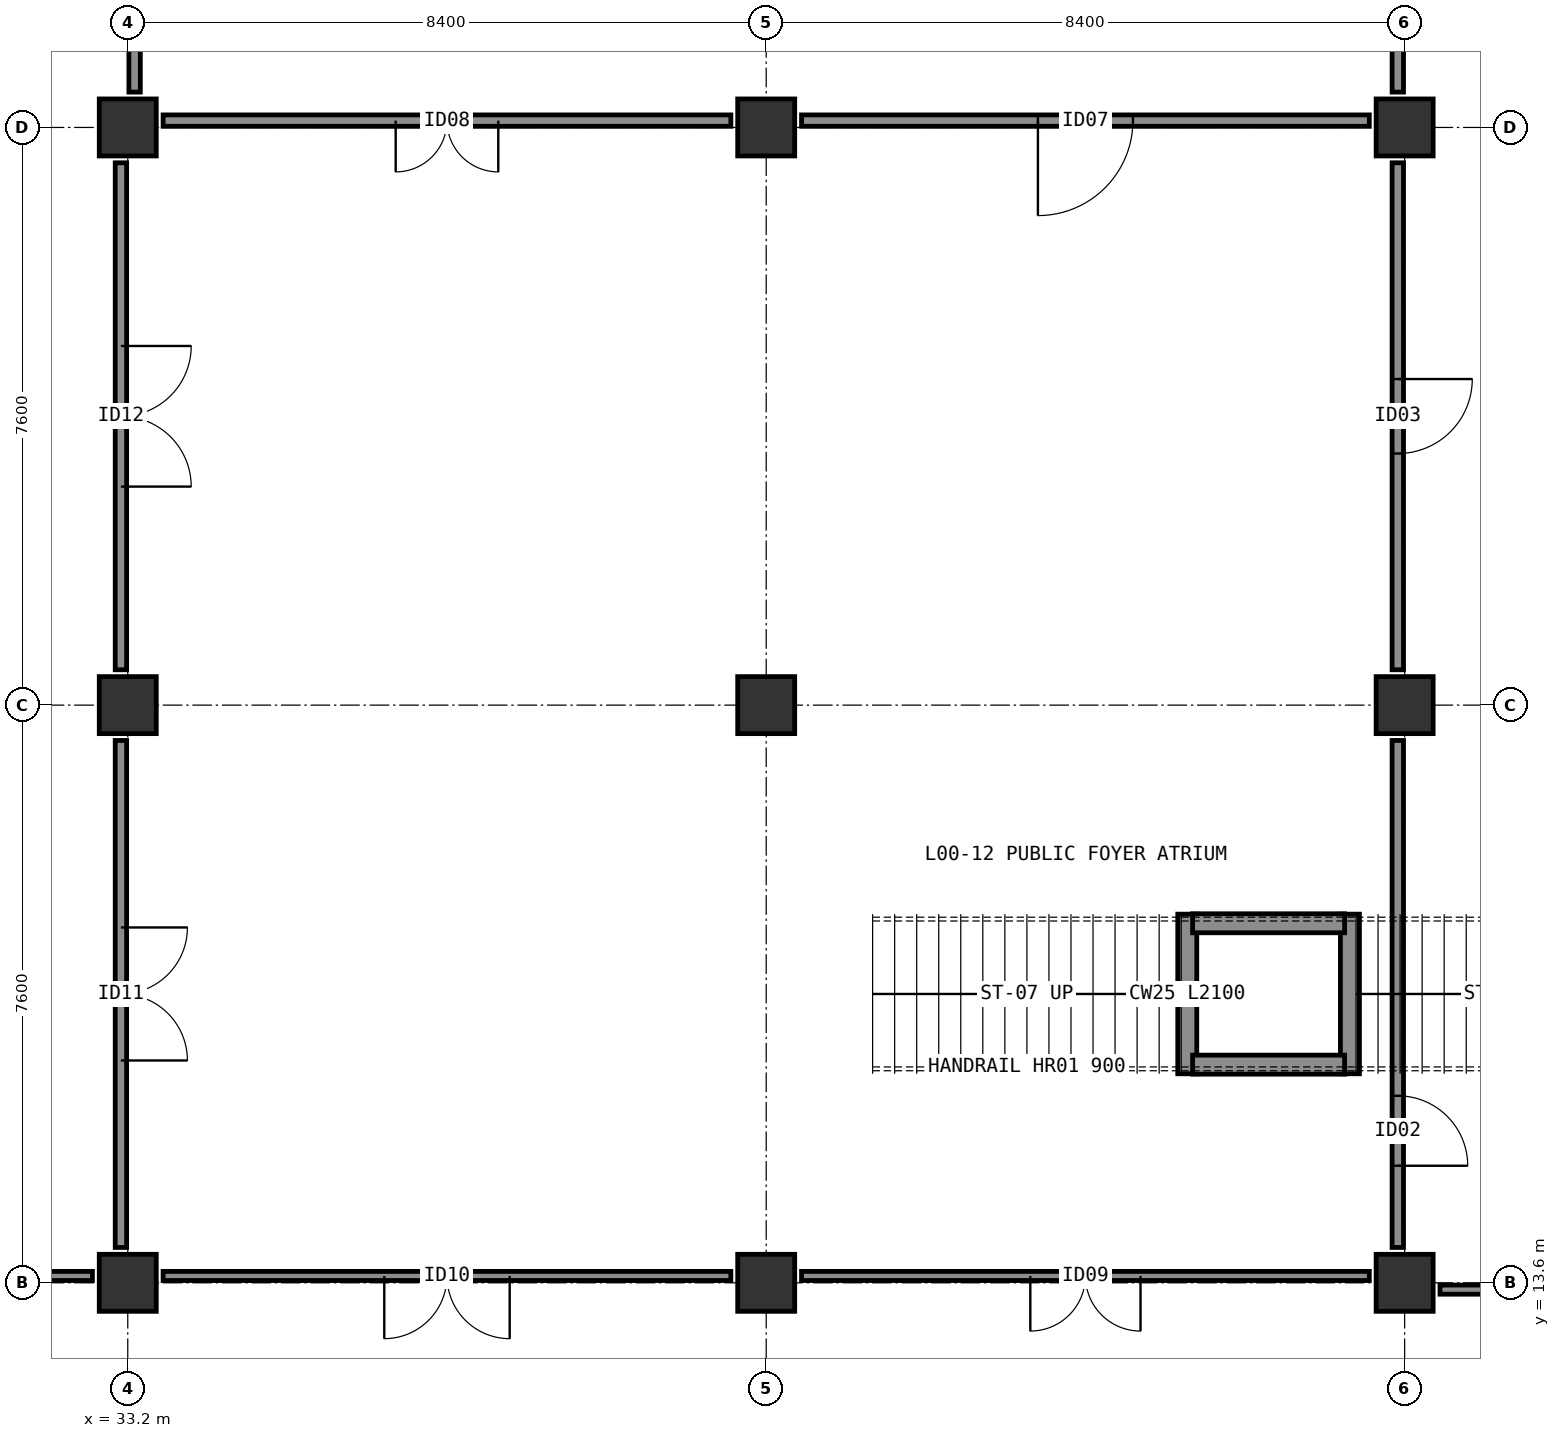
"""IFC4 building model, lengths in metres.
Left out: names, types, materials, properties, quantities, classifications, styles, units other than length and angle.
Written with IfcOpenShell. Run it as: python <this file> out.ifc"""

import sys

from ifc_helpers import new_model, si_unit, direction, frame, frame_2d, origin, origin_2d, place, context, subcontext, project, spatial, rectangle, extrude, element, fill, save


model = new_model("IFC4")
c1 = context("Model", 3, precision=1e-05, world=origin(), true_north=direction((0.0, 1.0)))
c2 = subcontext(c1, "Body", "Model", "MODEL_VIEW")
j1 = project(units=[si_unit("LENGTHUNIT", "METRE"), si_unit("PLANEANGLEUNIT", "RADIAN")], contexts=[c1])
p1 = place(None, origin())
s1 = spatial("IfcSite", under=j1, at=p1, CompositionType="ELEMENT")
p2 = place(p1, origin())
s2 = spatial("IfcBuilding", under=s1, at=p2, CompositionType="ELEMENT")
p3 = place(p2, origin())
s3 = spatial("IfcBuildingStorey", under=s2, at=p3, CompositionType="ELEMENT", Elevation=0.0)
for number, where, z_axis, x_axis in (
    (1, (33.2, 13.6, 0.0), (0.0, 0.0, 1.0), (1.0, 0.0, 0.0)),
    (2, (41.6, 13.6, 0.0), (0.0, 0.0, 1.0), (1.0, 0.0, 0.0)),
    (3, (50.0, 13.6, 0.0), (0.0, 0.0, 1.0), (1.0, 0.0, 0.0)),
    (4, (33.2, 21.2, 0.0), (0.0, 0.0, 1.0), (1.0, 0.0, 0.0)),
    (5, (41.6, 21.2, 0.0), (0.0, 0.0, 1.0), (1.0, 0.0, 0.0)),
    (6, (50.0, 21.2, 0.0), (0.0, 0.0, 1.0), (1.0, 0.0, 0.0)),
    (7, (33.2, 28.8, 0.0), (0.0, 0.0, 1.0), (1.0, 0.0, 0.0)),
    (8, (41.6, 28.8, 0.0), (0.0, 0.0, 1.0), (1.0, 0.0, 0.0)),
    (9, (50.0, 28.8, 0.0), (0.0, 0.0, 1.0), (1.0, 0.0, 0.0)),
):
    element("IfcColumn", number, at=place(p3, frame(where, z_axis=z_axis, x_axis=x_axis)), inside=s3, PredefinedType="COLUMN", context=c2, shape_type="SweptSolid", body=[
        extrude(rectangle(XDim=0.75, YDim=0.75, at=origin_2d()), origin(), (0.0, 0.0, 1.0), 4.8),
    ])
for number, where, z_axis, x_axis in (
    (10, (47.14, 16.35, 0.0), (0.0, 0.0, 1.0), (0.0, 1.0, 0.0)),
    (11, (49.28, 16.35, 0.0), (0.0, 0.0, 1.0), (0.0, 1.0, 0.0)),
):
    element("IfcWall", number, at=place(p3, frame(where, z_axis=z_axis, x_axis=x_axis)), inside=s3, PredefinedType="SHEAR", context=c2, shape_type="SweptSolid", body=[
        extrude(rectangle(XDim=2.1, YDim=0.25, at=frame_2d((1.05, 0.0))), origin(), (0.0, 0.0, 1.0), 2.21),
    ])
for number, where, z_axis, x_axis in (
    (12, (47.21, 16.47, 0.0), (0.0, 0.0, 1.0), (1.0, 0.0, 0.0)),
    (13, (47.21, 18.33, 0.0), (0.0, 0.0, 1.0), (1.0, 0.0, 0.0)),
):
    element("IfcWall", number, at=place(p3, frame(where, z_axis=z_axis, x_axis=x_axis)), inside=s3, PredefinedType="SHEAR", context=c2, shape_type="SweptSolid", body=[
        extrude(rectangle(XDim=2.0, YDim=0.25, at=frame_2d((1.0, 0.0))), origin(), (0.0, 0.0, 1.0), 2.21),
    ])
p4 = place(p3, frame((33.29, 29.265, 0.0), z_axis=(0.0, 0.0, 1.0), x_axis=(0.0, 1.0, 0.0)))
e14 = element("IfcWall", 14, at=p4, inside=s3, PredefinedType="PARTITIONING", context=c2, shape_type="SweptSolid", body=[
    extrude(rectangle(XDim=6.655, YDim=0.15, at=frame_2d((3.328, 0.0))), origin(), (0.0, 0.0, 1.0), 4.5),
])
p5 = place(p4, frame((2.603, 0.0, 0.0)))
e15 = element("IfcOpeningElement", 15, at=p5, cuts=e14, PredefinedType="OPENING", context=c2, shape_type="SweptSolid", body=[
    extrude(rectangle(XDim=1.45, YDim=2.18, at=frame_2d((0.725, 1.09))), frame((0.0, 0.085, 0.0), z_axis=(0.0, -1.0, 0.0), x_axis=(1.0, 0.0, 0.0)), (0.0, 0.0, 1.0), 0.17),
])
p6 = place(p3, frame((49.91, 35.92, 0.0), z_axis=(0.0, 0.0, 1.0), x_axis=(-7.3370263e-05, -0.999999997308, 0.0)))
e16 = element("IfcWall", 16, at=p6, inside=s3, PredefinedType="PARTITIONING", context=c2, shape_type="SweptSolid", body=[
    extrude(rectangle(XDim=6.655, YDim=0.15, at=frame_2d((3.328, 0.0))), origin(), (0.0, 0.0, 1.0), 3.81),
])
p7 = place(p6, frame((2.502, 0.0, 0.0)))
e17 = element("IfcOpeningElement", 17, at=p7, cuts=e16, PredefinedType="OPENING", context=c2, shape_type="SweptSolid", body=[
    extrude(rectangle(XDim=1.65, YDim=2.18, at=frame_2d((0.825, 1.09))), frame((0.0, 0.085, 0.0), z_axis=(0.0, -1.0, 0.0), x_axis=(1.0, 0.0, 0.0)), (0.0, 0.0, 1.0), 0.17),
])
p8 = place(p3, frame((33.11, 20.735, 0.0), z_axis=(0.0, 0.0, 1.0), x_axis=(0.0, -1.0, 0.0)))
e18 = element("IfcWall", 18, at=p8, inside=s3, PredefinedType="PARTITIONING", context=c2, shape_type="SweptSolid", body=[
    extrude(rectangle(XDim=6.67, YDim=0.15, at=frame_2d((3.335, 0.0))), origin(), (0.0, 0.0, 1.0), 3.81),
])
p9 = place(p8, frame((2.46, 0.0, 0.0)))
e19 = element("IfcOpeningElement", 19, at=p9, cuts=e18, PredefinedType="OPENING", context=c2, shape_type="SweptSolid", body=[
    extrude(rectangle(XDim=1.75, YDim=2.22, at=frame_2d((0.875, 1.11))), frame((0.0, 0.085, 0.0), z_axis=(0.0, -1.0, 0.0), x_axis=(1.0, 0.0, 0.0)), (0.0, 0.0, 1.0), 0.17),
])
p10 = place(p3, frame((33.11, 28.335, 0.0), z_axis=(0.0, 0.0, 1.0), x_axis=(0.0, -1.0, 0.0)))
e20 = element("IfcWall", 20, at=p10, inside=s3, PredefinedType="PARTITIONING", context=c2, shape_type="SweptSolid", body=[
    extrude(rectangle(XDim=6.67, YDim=0.15, at=frame_2d((3.335, 0.0))), origin(), (0.0, 0.0, 1.0), 3.81),
])
p11 = place(p10, frame((2.41, 0.0, 0.0)))
e21 = element("IfcOpeningElement", 21, at=p11, cuts=e20, PredefinedType="OPENING", context=c2, shape_type="SweptSolid", body=[
    extrude(rectangle(XDim=1.85, YDim=2.22, at=frame_2d((0.925, 1.11))), frame((0.0, 0.085, 0.0), z_axis=(0.0, -1.0, 0.0), x_axis=(1.0, 0.0, 0.0)), (0.0, 0.0, 1.0), 0.17),
])
p12 = place(p3, frame((32.735, 13.69, 0.0), z_axis=(0.0, 0.0, 1.0), x_axis=(-1.0, 0.0, 0.0)))
e22 = element("IfcWall", 22, at=p12, inside=s3, PredefinedType="PARTITIONING", context=c2, shape_type="SweptSolid", body=[
    extrude(rectangle(XDim=7.455, YDim=0.12, at=frame_2d((3.728, 0.0))), origin(), (0.0, 0.0, 1.0), 4.5),
])
p13 = place(p12, frame((3.288, 0.0, 0.0)))
e23 = element("IfcOpeningElement", 23, at=p13, cuts=e22, PredefinedType="OPENING", context=c2, shape_type="SweptSolid", body=[
    extrude(rectangle(XDim=0.88, YDim=2.08, at=frame_2d((0.44, 1.04))), frame((0.0, 0.07, 0.0), z_axis=(0.0, -1.0, 0.0), x_axis=(1.0, 0.0, 0.0)), (0.0, 0.0, 1.0), 0.14),
])
p14 = place(p3, frame((49.91, 20.735, 0.0), z_axis=(0.0, 0.0, 1.0), x_axis=(0.0, -1.0, 0.0)))
e24 = element("IfcWall", 24, at=p14, inside=s3, PredefinedType="PARTITIONING", context=c2, shape_type="SweptSolid", body=[
    extrude(rectangle(XDim=6.67, YDim=0.15, at=frame_2d((3.335, 0.0))), origin(), (0.0, 0.0, 1.0), 4.5),
])
p15 = place(p14, frame((4.675, 0.0, 0.0)))
e25 = element("IfcOpeningElement", 25, at=p15, cuts=e24, PredefinedType="OPENING", context=c2, shape_type="SweptSolid", body=[
    extrude(rectangle(XDim=0.92, YDim=2.08, at=frame_2d((0.46, 1.04))), frame((0.0, 0.085, 0.0), z_axis=(0.0, -1.0, 0.0), x_axis=(1.0, 0.0, 0.0)), (0.0, 0.0, 1.0), 0.17),
])
p16 = place(p3, frame((49.91, 28.335, 0.0), z_axis=(0.0, 0.0, 1.0), x_axis=(0.0, -1.0, 0.0)))
e26 = element("IfcWall", 26, at=p16, inside=s3, PredefinedType="PARTITIONING", context=c2, shape_type="SweptSolid", body=[
    extrude(rectangle(XDim=6.67, YDim=0.15, at=frame_2d((3.335, 0.0))), origin(), (0.0, 0.0, 1.0), 4.5),
])
p17 = place(p16, frame((2.845, 0.0, 0.0)))
e27 = element("IfcOpeningElement", 27, at=p17, cuts=e26, PredefinedType="OPENING", context=c2, shape_type="SweptSolid", body=[
    extrude(rectangle(XDim=0.98, YDim=2.08, at=frame_2d((0.49, 1.04))), frame((0.0, 0.085, 0.0), z_axis=(0.0, -1.0, 0.0), x_axis=(1.0, 0.0, 0.0)), (0.0, 0.0, 1.0), 0.17),
])
p18 = place(p3, frame((50.465, 13.51, 0.0), z_axis=(0.0, 0.0, 1.0), x_axis=(1.0, 0.0, 0.0)))
e28 = element("IfcWall", 28, at=p18, inside=s3, PredefinedType="PARTITIONING", context=c2, shape_type="SweptSolid", body=[
    extrude(rectangle(XDim=7.47, YDim=0.12, at=frame_2d((3.735, 0.0))), origin(), (0.0, 0.0, 1.0), 3.81),
])
p19 = place(p18, frame((3.225, 0.0, 0.0)))
e29 = element("IfcOpeningElement", 29, at=p19, cuts=e28, PredefinedType="OPENING", context=c2, shape_type="SweptSolid", body=[
    extrude(rectangle(XDim=1.02, YDim=2.12, at=frame_2d((0.51, 1.06))), frame((0.0, 0.07, 0.0), z_axis=(0.0, -1.0, 0.0), x_axis=(1.0, 0.0, 0.0)), (0.0, 0.0, 1.0), 0.14),
])
p20 = place(p3, frame((49.535, 28.89, 0.0), z_axis=(0.0, 0.0, 1.0), x_axis=(-1.0, 0.0, 0.0)))
e30 = element("IfcWall", 30, at=p20, inside=s3, PredefinedType="PARTITIONING", context=c2, shape_type="SweptSolid", body=[
    extrude(rectangle(XDim=7.47, YDim=0.15, at=frame_2d((3.735, 0.0))), origin(), (0.0, 0.0, 1.0), 3.81),
])
p21 = place(p20, frame((3.11, 0.0, 0.0)))
e31 = element("IfcOpeningElement", 31, at=p21, cuts=e30, PredefinedType="OPENING", context=c2, shape_type="SweptSolid", body=[
    extrude(rectangle(XDim=1.25, YDim=2.12, at=frame_2d((0.625, 1.06))), frame((0.0, 0.085, 0.0), z_axis=(0.0, -1.0, 0.0), x_axis=(1.0, 0.0, 0.0)), (0.0, 0.0, 1.0), 0.17),
])
p22 = place(p3, frame((41.135, 28.89, 0.0), z_axis=(0.0, 0.0, 1.0), x_axis=(-1.0, 0.0, 0.0)))
e32 = element("IfcWall", 32, at=p22, inside=s3, PredefinedType="PARTITIONING", context=c2, shape_type="SweptSolid", body=[
    extrude(rectangle(XDim=7.47, YDim=0.15, at=frame_2d((3.735, 0.0))), origin(), (0.0, 0.0, 1.0), 4.047),
])
p23 = place(p22, frame((3.06, 0.0, 0.0)))
e33 = element("IfcOpeningElement", 33, at=p23, cuts=e32, PredefinedType="OPENING", context=c2, shape_type="SweptSolid", body=[
    extrude(rectangle(XDim=1.35, YDim=2.18, at=frame_2d((0.675, 1.09))), frame((0.0, 0.085, 0.0), z_axis=(0.0, -1.0, 0.0), x_axis=(1.0, 0.0, 0.0)), (0.0, 0.0, 1.0), 0.17),
])
p24 = place(p3, frame((49.535, 13.69, 0.0), z_axis=(0.0, 0.0, 1.0), x_axis=(-1.0, 0.0, 0.0)))
e34 = element("IfcWall", 34, at=p24, inside=s3, PredefinedType="PARTITIONING", context=c2, shape_type="SweptSolid", body=[
    extrude(rectangle(XDim=7.47, YDim=0.12, at=frame_2d((3.735, 0.0))), origin(), (0.0, 0.0, 1.0), 3.81),
])
p25 = place(p24, frame((3.01, 0.0, 0.0)))
e35 = element("IfcOpeningElement", 35, at=p25, cuts=e34, PredefinedType="OPENING", context=c2, shape_type="SweptSolid", body=[
    extrude(rectangle(XDim=1.45, YDim=2.18, at=frame_2d((0.725, 1.09))), frame((0.0, 0.07, 0.0), z_axis=(0.0, -1.0, 0.0), x_axis=(1.0, 0.0, 0.0)), (0.0, 0.0, 1.0), 0.14),
])
p26 = place(p3, frame((41.135, 13.69, 0.0), z_axis=(0.0, 0.0, 1.0), x_axis=(-1.0, 0.0, 0.0)))
e36 = element("IfcWall", 36, at=p26, inside=s3, PredefinedType="PARTITIONING", context=c2, shape_type="SweptSolid", body=[
    extrude(rectangle(XDim=7.47, YDim=0.12, at=frame_2d((3.735, 0.0))), origin(), (0.0, 0.0, 1.0), 3.81),
])
p27 = place(p26, frame((2.91, 0.0, 0.0)))
e37 = element("IfcOpeningElement", 37, at=p27, cuts=e36, PredefinedType="OPENING", context=c2, shape_type="SweptSolid", body=[
    extrude(rectangle(XDim=1.65, YDim=2.18, at=frame_2d((0.825, 1.09))), frame((0.0, 0.07, 0.0), z_axis=(0.0, -1.0, 0.0), x_axis=(1.0, 0.0, 0.0)), (0.0, 0.0, 1.0), 0.14),
])
p28 = place(p9, origin())
e38 = element("IfcDoor", 38, at=p28, inside=s3, OperationType="DOUBLE_DOOR_SINGLE_SWING", PredefinedType="DOOR", context=c2, shape_type="SweptSolid", body=[
    extrude(rectangle(XDim=1.75, YDim=2.22, at=frame_2d((0.875, 1.11))), frame((0.0, 0.025, 0.0), z_axis=(0.0, -1.0, 0.0), x_axis=(1.0, 0.0, 0.0)), (0.0, 0.0, 1.0), 0.05),
])
fill(e19, e38)
p29 = place(p11, origin())
e39 = element("IfcDoor", 39, at=p29, inside=s3, OperationType="DOUBLE_DOOR_SINGLE_SWING", PredefinedType="DOOR", context=c2, shape_type="SweptSolid", body=[
    extrude(rectangle(XDim=1.85, YDim=2.22, at=frame_2d((0.925, 1.11))), frame((0.0, 0.025, 0.0), z_axis=(0.0, -1.0, 0.0), x_axis=(1.0, 0.0, 0.0)), (0.0, 0.0, 1.0), 0.05),
])
fill(e21, e39)
p30 = place(p15, origin())
e40 = element("IfcDoor", 40, at=p30, inside=s3, OperationType="SINGLE_SWING_RIGHT", PredefinedType="DOOR", context=c2, shape_type="SweptSolid", body=[
    extrude(rectangle(XDim=0.92, YDim=2.08, at=frame_2d((0.46, 1.04))), frame((0.0, 0.025, 0.0), z_axis=(0.0, -1.0, 0.0), x_axis=(1.0, 0.0, 0.0)), (0.0, 0.0, 1.0), 0.05),
])
fill(e25, e40)
p31 = place(p17, origin())
e41 = element("IfcDoor", 41, at=p31, inside=s3, OperationType="SINGLE_SWING_LEFT", PredefinedType="DOOR", context=c2, shape_type="SweptSolid", body=[
    extrude(rectangle(XDim=0.98, YDim=2.08, at=frame_2d((0.49, 1.04))), frame((0.0, 0.025, 0.0), z_axis=(0.0, -1.0, 0.0), x_axis=(1.0, 0.0, 0.0)), (0.0, 0.0, 1.0), 0.05),
])
fill(e27, e41)
p32 = place(p21, origin())
e42 = element("IfcDoor", 42, at=p32, inside=s3, OperationType="SINGLE_SWING_RIGHT", PredefinedType="DOOR", context=c2, shape_type="SweptSolid", body=[
    extrude(rectangle(XDim=1.25, YDim=2.12, at=frame_2d((0.625, 1.06))), frame((0.0, 0.025, 0.0), z_axis=(0.0, -1.0, 0.0), x_axis=(1.0, 0.0, 0.0)), (0.0, 0.0, 1.0), 0.05),
])
fill(e31, e42)
p33 = place(p23, origin())
e43 = element("IfcDoor", 43, at=p33, inside=s3, OperationType="DOUBLE_DOOR_SINGLE_SWING", PredefinedType="DOOR", context=c2, shape_type="SweptSolid", body=[
    extrude(rectangle(XDim=1.35, YDim=2.18, at=frame_2d((0.675, 1.09))), frame((0.0, 0.025, 0.0), z_axis=(0.0, -1.0, 0.0), x_axis=(1.0, 0.0, 0.0)), (0.0, 0.0, 1.0), 0.05),
])
fill(e33, e43)
p34 = place(p25, origin())
e44 = element("IfcDoor", 44, at=p34, inside=s3, OperationType="DOUBLE_DOOR_SINGLE_SWING", PredefinedType="DOOR", context=c2, shape_type="SweptSolid", body=[
    extrude(rectangle(XDim=1.45, YDim=2.18, at=frame_2d((0.725, 1.09))), frame((0.0, 0.025, 0.0), z_axis=(0.0, -1.0, 0.0), x_axis=(1.0, 0.0, 0.0)), (0.0, 0.0, 1.0), 0.05),
])
fill(e35, e44)
p35 = place(p27, origin())
e45 = element("IfcDoor", 45, at=p35, inside=s3, OperationType="DOUBLE_DOOR_SINGLE_SWING", PredefinedType="DOOR", context=c2, shape_type="SweptSolid", body=[
    extrude(rectangle(XDim=1.65, YDim=2.18, at=frame_2d((0.825, 1.09))), frame((0.0, 0.025, 0.0), z_axis=(0.0, -1.0, 0.0), x_axis=(1.0, 0.0, 0.0)), (0.0, 0.0, 1.0), 0.05),
])
fill(e37, e45)
save(model, sys.argv[1])
